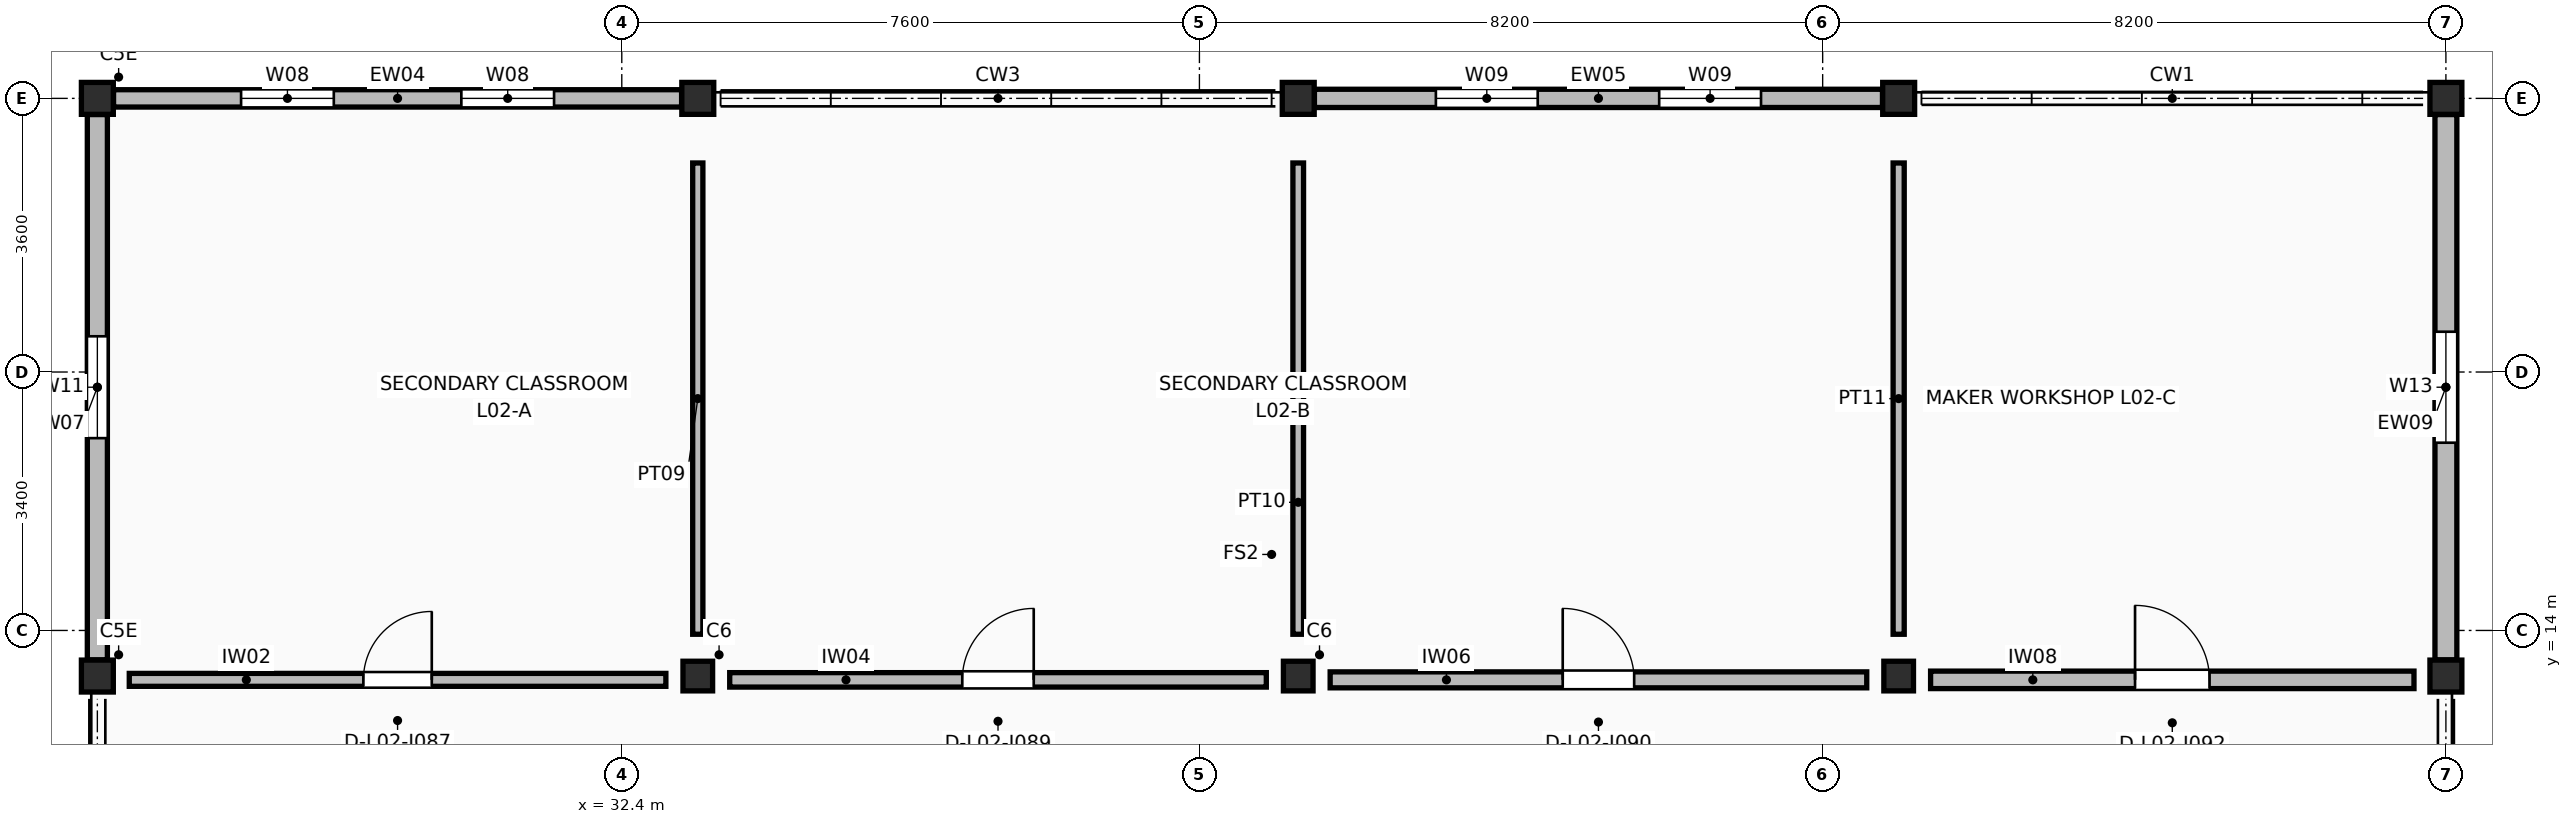
"""IFC4 building model, lengths in metres.
Left out: names, types, materials, properties, quantities, classifications, styles, units other than length and angle.
Written with IfcOpenShell. Run it as: python <this file> out.ifc"""

import sys

from ifc_helpers import new_model, si_unit, direction, frame, frame_2d, origin, origin_2d, place, context, subcontext, project, spatial, rectangle, extrude, element, fill, save


model = new_model("IFC4")
c1 = context("Model", 3, precision=1e-05, world=origin(), true_north=direction((0.0, 1.0)))
c2 = subcontext(c1, "Body", "Model", "MODEL_VIEW")
j1 = project(units=[si_unit("LENGTHUNIT", "METRE"), si_unit("PLANEANGLEUNIT", "RADIAN")], contexts=[c1])
p1 = place(None, origin())
s1 = spatial("IfcSite", under=j1, at=p1, CompositionType="ELEMENT")
p2 = place(p1, origin())
s2 = spatial("IfcBuilding", under=s1, at=p2, CompositionType="ELEMENT")
p3 = place(p2, frame((0.0, 0.0, 8.16)))
s3 = spatial("IfcBuildingStorey", under=s2, at=p3, CompositionType="ELEMENT", Elevation=8.16)
for number, where, z_axis, x_axis in (
    (1, (25.5, 13.4, 0.0), (0.0, 0.0, 1.0), (1.0, 0.0, 0.0)),
    (2, (25.5, 21.0, 0.0), (0.0, 0.0, 1.0), (1.0, 0.0, 0.0)),
):
    element("IfcColumn", number, at=place(p3, frame(where, z_axis=z_axis, x_axis=x_axis)), inside=s3, PredefinedType="COLUMN", context=c2, shape_type="SweptSolid", body=[
        extrude(rectangle(XDim=0.42, YDim=0.42, at=origin_2d()), origin(), (0.0, 0.0, 1.0), 3.74),
    ])
p4 = place(p3, frame((33.4, 13.4, 0.0), z_axis=(0.0, 0.0, 1.0), x_axis=(1.0, 0.0, 0.0)))
e3 = element("IfcColumn", 3, at=p4, inside=s3, PredefinedType="COLUMN", context=c2, shape_type="SweptSolid", body=[
    extrude(rectangle(XDim=0.39, YDim=0.39, at=origin_2d()), origin(), (0.0, 0.0, 1.0), 3.74),
])
p5 = place(p3, frame((33.4, 21.0, 0.0), z_axis=(0.0, 0.0, 1.0), x_axis=(1.0, 0.0, 0.0)))
e4 = element("IfcColumn", 4, at=p5, inside=s3, PredefinedType="COLUMN", context=c2, shape_type="SweptSolid", body=[
    extrude(rectangle(XDim=0.42, YDim=0.42, at=origin_2d()), origin(), (0.0, 0.0, 1.0), 3.74),
])
p6 = place(p3, frame((41.3, 13.4, 0.0), z_axis=(0.0, 0.0, 1.0), x_axis=(1.0, 0.0, 0.0)))
e5 = element("IfcColumn", 5, at=p6, inside=s3, PredefinedType="COLUMN", context=c2, shape_type="SweptSolid", body=[
    extrude(rectangle(XDim=0.39, YDim=0.39, at=origin_2d()), origin(), (0.0, 0.0, 1.0), 3.74),
])
p7 = place(p3, frame((41.3, 21.0, 0.0), z_axis=(0.0, 0.0, 1.0), x_axis=(1.0, 0.0, 0.0)))
e6 = element("IfcColumn", 6, at=p7, inside=s3, PredefinedType="COLUMN", context=c2, shape_type="SweptSolid", body=[
    extrude(rectangle(XDim=0.42, YDim=0.42, at=origin_2d()), origin(), (0.0, 0.0, 1.0), 3.74),
])
p8 = place(p3, frame((49.2, 13.4, 0.0), z_axis=(0.0, 0.0, 1.0), x_axis=(1.0, 0.0, 0.0)))
e7 = element("IfcColumn", 7, at=p8, inside=s3, PredefinedType="COLUMN", context=c2, shape_type="SweptSolid", body=[
    extrude(rectangle(XDim=0.39, YDim=0.39, at=origin_2d()), origin(), (0.0, 0.0, 1.0), 3.74),
])
for number, where, z_axis, x_axis in (
    (8, (49.2, 21.0, 0.0), (0.0, 0.0, 1.0), (1.0, 0.0, 0.0)),
    (9, (56.4, 13.4, 0.0), (0.0, 0.0, 1.0), (1.0, 0.0, 0.0)),
    (10, (56.4, 21.0, 0.0), (0.0, 0.0, 1.0), (1.0, 0.0, 0.0)),
):
    element("IfcColumn", number, at=place(p3, frame(where, z_axis=z_axis, x_axis=x_axis)), inside=s3, PredefinedType="COLUMN", context=c2, shape_type="SweptSolid", body=[
        extrude(rectangle(XDim=0.42, YDim=0.42, at=origin_2d()), origin(), (0.0, 0.0, 1.0), 3.74),
    ])
p9 = place(p3, frame((25.713, 21.0, 0.0), z_axis=(0.0, 0.0, 1.0), x_axis=(1.0, 0.0, 0.0)))
e11 = element("IfcWall", 11, at=p9, inside=s3, PredefinedType="STANDARD", context=c2, shape_type="SweptSolid", body=[
    extrude(rectangle(XDim=7.474, YDim=0.228, at=frame_2d((3.737, 0.0))), origin(), (0.0, 0.0, 1.0), 2.78),
])
p10 = place(p9, frame((1.678, 0.0, 0.95)))
e12 = element("IfcOpeningElement", 12, at=p10, cuts=e11, PredefinedType="OPENING", context=c2, shape_type="SweptSolid", body=[
    extrude(rectangle(XDim=1.22, YDim=1.6, at=frame_2d((0.61, 0.8))), frame((0.0, 0.124, 0.0), z_axis=(0.0, -1.0, 0.0), x_axis=(1.0, 0.0, 0.0)), (0.0, 0.0, 1.0), 0.248),
])
p11 = place(p9, frame((4.576, 0.0, 0.95)))
e13 = element("IfcOpeningElement", 13, at=p11, cuts=e11, PredefinedType="OPENING", context=c2, shape_type="SweptSolid", body=[
    extrude(rectangle(XDim=1.22, YDim=1.6, at=frame_2d((0.61, 0.8))), frame((0.0, 0.124, 0.0), z_axis=(0.0, -1.0, 0.0), x_axis=(1.0, 0.0, 0.0)), (0.0, 0.0, 1.0), 0.248),
])
p12 = place(p3, frame((41.513, 21.0, 0.0), z_axis=(0.0, 0.0, 1.0), x_axis=(1.0, 0.0, 0.0)))
e14 = element("IfcWall", 14, at=p12, inside=s3, PredefinedType="STANDARD", context=c2, shape_type="SweptSolid", body=[
    extrude(rectangle(XDim=7.474, YDim=0.24, at=frame_2d((3.737, 0.0))), origin(), (0.0, 0.0, 1.0), 2.78),
])
p13 = place(p12, frame((1.598, 0.0, 0.95)))
e15 = element("IfcOpeningElement", 15, at=p13, cuts=e14, PredefinedType="OPENING", context=c2, shape_type="SweptSolid", body=[
    extrude(rectangle(XDim=1.34, YDim=1.15, at=frame_2d((0.67, 0.575))), frame((0.0, 0.13, 0.0), z_axis=(0.0, -1.0, 0.0), x_axis=(1.0, 0.0, 0.0)), (0.0, 0.0, 1.0), 0.26),
])
p14 = place(p12, frame((4.536, 0.0, 0.95)))
e16 = element("IfcOpeningElement", 16, at=p14, cuts=e14, PredefinedType="OPENING", context=c2, shape_type="SweptSolid", body=[
    extrude(rectangle(XDim=1.34, YDim=1.15, at=frame_2d((0.67, 0.575))), frame((0.0, 0.13, 0.0), z_axis=(0.0, -1.0, 0.0), x_axis=(1.0, 0.0, 0.0)), (0.0, 0.0, 1.0), 0.26),
])
p15 = place(p3, frame((25.5, 13.613, 0.0), z_axis=(0.0, 0.0, 1.0), x_axis=(0.0, 1.0, 0.0)))
e17 = element("IfcWall", 17, at=p15, inside=s3, PredefinedType="STANDARD", context=c2, shape_type="SweptSolid", body=[
    extrude(rectangle(XDim=7.174, YDim=0.264, at=frame_2d((3.587, 0.0))), origin(), (0.0, 0.0, 1.0), 2.78),
])
p16 = place(p15, frame((2.917, 0.0, 0.95)))
e18 = element("IfcOpeningElement", 18, at=p16, cuts=e17, PredefinedType="OPENING", context=c2, shape_type="SweptSolid", body=[
    extrude(rectangle(XDim=1.34, YDim=1.45, at=frame_2d((0.67, 0.725))), frame((0.0, 0.142, 0.0), z_axis=(0.0, -1.0, 0.0), x_axis=(1.0, 0.0, 0.0)), (0.0, 0.0, 1.0), 0.284),
])
p17 = place(p3, frame((56.4, 13.613, 0.0), z_axis=(0.0, 0.0, 1.0), x_axis=(0.0, 1.0, 0.0)))
e19 = element("IfcWall", 19, at=p17, inside=s3, PredefinedType="STANDARD", context=c2, shape_type="SweptSolid", body=[
    extrude(rectangle(XDim=7.174, YDim=0.288, at=frame_2d((3.587, 0.0))), origin(), (0.0, 0.0, 1.0), 2.78),
])
p18 = place(p17, frame((2.857, 0.0, 0.95)))
e20 = element("IfcOpeningElement", 20, at=p18, cuts=e19, PredefinedType="OPENING", context=c2, shape_type="SweptSolid", body=[
    extrude(rectangle(XDim=1.46, YDim=1.15, at=frame_2d((0.73, 0.575))), frame((0.0, 0.154, 0.0), z_axis=(0.0, -1.0, 0.0), x_axis=(1.0, 0.0, 0.0)), (0.0, 0.0, 1.0), 0.308),
])
p19 = place(p3, frame((25.92, 13.35, 0.0), z_axis=(0.0, 0.0, 1.0), x_axis=(1.0, 0.0, 0.0)))
e21 = element("IfcWall", 21, at=p19, inside=s3, PredefinedType="STANDARD", context=c2, shape_type="SweptSolid", body=[
    extrude(rectangle(XDim=7.06, YDim=0.17, at=frame_2d((3.53, 0.0))), origin(), (0.0, 0.0, 1.0), 2.75),
])
p20 = place(p19, frame((3.08, 0.0, 0.0)))
e22 = element("IfcOpeningElement", 22, at=p20, cuts=e21, PredefinedType="OPENING", context=c2, shape_type="SweptSolid", body=[
    extrude(rectangle(XDim=0.9, YDim=2.24, at=frame_2d((0.45, 1.12))), frame((0.0, 0.095, 0.0), z_axis=(0.0, -1.0, 0.0), x_axis=(1.0, 0.0, 0.0)), (0.0, 0.0, 1.0), 0.19),
])
p21 = place(p3, frame((33.82, 13.35, 0.0), z_axis=(0.0, 0.0, 1.0), x_axis=(1.0, 0.0, 0.0)))
e23 = element("IfcWall", 23, at=p21, inside=s3, PredefinedType="STANDARD", context=c2, shape_type="SweptSolid", body=[
    extrude(rectangle(XDim=7.06, YDim=0.19, at=frame_2d((3.53, 0.0))), origin(), (0.0, 0.0, 1.0), 2.75),
])
p22 = place(p21, frame((3.06, 0.0, 0.0)))
e24 = element("IfcOpeningElement", 24, at=p22, cuts=e23, PredefinedType="OPENING", context=c2, shape_type="SweptSolid", body=[
    extrude(rectangle(XDim=0.94, YDim=2.12, at=frame_2d((0.47, 1.06))), frame((0.0, 0.105, 0.0), z_axis=(0.0, -1.0, 0.0), x_axis=(1.0, 0.0, 0.0)), (0.0, 0.0, 1.0), 0.21),
])
p23 = place(p3, frame((41.72, 13.35, 0.0), z_axis=(0.0, 0.0, 1.0), x_axis=(1.0, 0.0, 0.0)))
e25 = element("IfcWall", 25, at=p23, inside=s3, PredefinedType="STANDARD", context=c2, shape_type="SweptSolid", body=[
    extrude(rectangle(XDim=7.06, YDim=0.21, at=frame_2d((3.53, 0.0))), origin(), (0.0, 0.0, 1.0), 2.75),
])
p24 = place(p23, frame((3.06, 0.0, 0.0)))
e26 = element("IfcOpeningElement", 26, at=p24, cuts=e25, PredefinedType="OPENING", context=c2, shape_type="SweptSolid", body=[
    extrude(rectangle(XDim=0.94, YDim=2.18, at=frame_2d((0.47, 1.09))), frame((0.0, 0.115, 0.0), z_axis=(0.0, -1.0, 0.0), x_axis=(1.0, 0.0, 0.0)), (0.0, 0.0, 1.0), 0.23),
])
p25 = place(p3, frame((49.62, 13.35, 0.0), z_axis=(0.0, 0.0, 1.0), x_axis=(1.0, 0.0, 0.0)))
e27 = element("IfcWall", 27, at=p25, inside=s3, PredefinedType="STANDARD", context=c2, shape_type="SweptSolid", body=[
    extrude(rectangle(XDim=6.36, YDim=0.23, at=frame_2d((3.18, 0.0))), origin(), (0.0, 0.0, 1.0), 2.75),
])
p26 = place(p25, frame((2.69, 0.0, 0.0)))
e28 = element("IfcOpeningElement", 28, at=p26, cuts=e27, PredefinedType="OPENING", context=c2, shape_type="SweptSolid", body=[
    extrude(rectangle(XDim=0.98, YDim=2.06, at=frame_2d((0.49, 1.03))), frame((0.0, 0.125, 0.0), z_axis=(0.0, -1.0, 0.0), x_axis=(1.0, 0.0, 0.0)), (0.0, 0.0, 1.0), 0.25),
])
p27 = place(p3, frame((33.4, 13.95, 0.0), z_axis=(0.0, 0.0, 1.0), x_axis=(0.0, 1.0, 0.0)))
e29 = element("IfcWall", 29, at=p27, inside=s3, PredefinedType="PARTITIONING", context=c2, shape_type="SweptSolid", body=[
    extrude(rectangle(XDim=6.2, YDim=0.134, at=frame_2d((3.1, 0.0))), origin(), (0.0, 0.0, 1.0), 2.75),
])
p28 = place(p3, frame((41.3, 13.95, 0.0), z_axis=(0.0, 0.0, 1.0), x_axis=(0.0, 1.0, 0.0)))
e30 = element("IfcWall", 30, at=p28, inside=s3, PredefinedType="PARTITIONING", context=c2, shape_type="SweptSolid", body=[
    extrude(rectangle(XDim=6.2, YDim=0.14, at=frame_2d((3.1, 0.0))), origin(), (0.0, 0.0, 1.0), 2.75),
])
p29 = place(p3, frame((49.2, 13.95, 0.0), z_axis=(0.0, 0.0, 1.0), x_axis=(0.0, 1.0, 0.0)))
e31 = element("IfcWall", 31, at=p29, inside=s3, PredefinedType="PARTITIONING", context=c2, shape_type="SweptSolid", body=[
    extrude(rectangle(XDim=6.2, YDim=0.146, at=frame_2d((3.1, 0.0))), origin(), (0.0, 0.0, 1.0), 2.75),
])
p30 = place(p10, origin())
e32 = element("IfcWindow", 32, at=p30, inside=s3, PartitioningType="SINGLE_PANEL", PredefinedType="WINDOW", context=c2, shape_type="SweptSolid", body=[
    extrude(rectangle(XDim=1.22, YDim=1.6, at=frame_2d((0.61, 0.8))), frame((0.0, 0.03, 0.0), z_axis=(0.0, -1.0, 0.0), x_axis=(1.0, 0.0, 0.0)), (0.0, 0.0, 1.0), 0.06),
])
fill(e12, e32)
p31 = place(p11, origin())
e33 = element("IfcWindow", 33, at=p31, inside=s3, PartitioningType="SINGLE_PANEL", PredefinedType="WINDOW", context=c2, shape_type="SweptSolid", body=[
    extrude(rectangle(XDim=1.22, YDim=1.6, at=frame_2d((0.61, 0.8))), frame((0.0, 0.03, 0.0), z_axis=(0.0, -1.0, 0.0), x_axis=(1.0, 0.0, 0.0)), (0.0, 0.0, 1.0), 0.06),
])
fill(e13, e33)
p32 = place(p13, origin())
e34 = element("IfcWindow", 34, at=p32, inside=s3, PartitioningType="SINGLE_PANEL", PredefinedType="WINDOW", context=c2, shape_type="SweptSolid", body=[
    extrude(rectangle(XDim=1.34, YDim=1.15, at=frame_2d((0.67, 0.575))), frame((0.0, 0.03, 0.0), z_axis=(0.0, -1.0, 0.0), x_axis=(1.0, 0.0, 0.0)), (0.0, 0.0, 1.0), 0.06),
])
fill(e15, e34)
p33 = place(p14, origin())
e35 = element("IfcWindow", 35, at=p33, inside=s3, PartitioningType="SINGLE_PANEL", PredefinedType="WINDOW", context=c2, shape_type="SweptSolid", body=[
    extrude(rectangle(XDim=1.34, YDim=1.15, at=frame_2d((0.67, 0.575))), frame((0.0, 0.03, 0.0), z_axis=(0.0, -1.0, 0.0), x_axis=(1.0, 0.0, 0.0)), (0.0, 0.0, 1.0), 0.06),
])
fill(e16, e35)
p34 = place(p16, origin())
e36 = element("IfcWindow", 36, at=p34, inside=s3, PartitioningType="SINGLE_PANEL", PredefinedType="WINDOW", context=c2, shape_type="SweptSolid", body=[
    extrude(rectangle(XDim=1.34, YDim=1.45, at=frame_2d((0.67, 0.725))), frame((0.0, 0.03, 0.0), z_axis=(0.0, -1.0, 0.0), x_axis=(1.0, 0.0, 0.0)), (0.0, 0.0, 1.0), 0.06),
])
fill(e18, e36)
p35 = place(p18, origin())
e37 = element("IfcWindow", 37, at=p35, inside=s3, PartitioningType="SINGLE_PANEL", PredefinedType="WINDOW", context=c2, shape_type="SweptSolid", body=[
    extrude(rectangle(XDim=1.46, YDim=1.15, at=frame_2d((0.73, 0.575))), frame((0.0, 0.03, 0.0), z_axis=(0.0, -1.0, 0.0), x_axis=(1.0, 0.0, 0.0)), (0.0, 0.0, 1.0), 0.06),
])
fill(e20, e37)
p36 = place(p20, frame((0.9, 0.0, 0.0), z_axis=(0.0, 0.0, 1.0), x_axis=(-1.0, 0.0, 0.0)))
e38 = element("IfcDoor", 38, at=p36, inside=s3, OperationType="SINGLE_SWING_RIGHT", PredefinedType="DOOR", context=c2, shape_type="SweptSolid", body=[
    extrude(rectangle(XDim=0.9, YDim=2.24, at=frame_2d((0.45, 1.12))), frame((0.0, 0.025, 0.0), z_axis=(0.0, -1.0, 0.0), x_axis=(1.0, 0.0, 0.0)), (0.0, 0.0, 1.0), 0.05),
])
fill(e22, e38)
p37 = place(p22, frame((0.94, 0.0, 0.0), z_axis=(0.0, 0.0, 1.0), x_axis=(-1.0, 0.0, 0.0)))
e39 = element("IfcDoor", 39, at=p37, inside=s3, OperationType="SINGLE_SWING_RIGHT", PredefinedType="DOOR", context=c2, shape_type="SweptSolid", body=[
    extrude(rectangle(XDim=0.94, YDim=2.12, at=frame_2d((0.47, 1.06))), frame((0.0, 0.025, 0.0), z_axis=(0.0, -1.0, 0.0), x_axis=(1.0, 0.0, 0.0)), (0.0, 0.0, 1.0), 0.05),
])
fill(e24, e39)
p38 = place(p24, frame((0.94, 0.0, 0.0), z_axis=(0.0, 0.0, 1.0), x_axis=(-1.0, 0.0, 0.0)))
e40 = element("IfcDoor", 40, at=p38, inside=s3, OperationType="SINGLE_SWING_LEFT", PredefinedType="DOOR", context=c2, shape_type="SweptSolid", body=[
    extrude(rectangle(XDim=0.94, YDim=2.18, at=frame_2d((0.47, 1.09))), frame((0.0, 0.025, 0.0), z_axis=(0.0, -1.0, 0.0), x_axis=(1.0, 0.0, 0.0)), (0.0, 0.0, 1.0), 0.05),
])
fill(e26, e40)
p39 = place(p26, frame((0.98, 0.0, 0.0), z_axis=(0.0, 0.0, 1.0), x_axis=(-1.0, 0.0, 0.0)))
e41 = element("IfcDoor", 41, at=p39, inside=s3, OperationType="SINGLE_SWING_LEFT", PredefinedType="DOOR", context=c2, shape_type="SweptSolid", body=[
    extrude(rectangle(XDim=0.98, YDim=2.06, at=frame_2d((0.49, 1.03))), frame((0.0, 0.025, 0.0), z_axis=(0.0, -1.0, 0.0), x_axis=(1.0, 0.0, 0.0)), (0.0, 0.0, 1.0), 0.05),
])
fill(e28, e41)
save(model, sys.argv[1])
